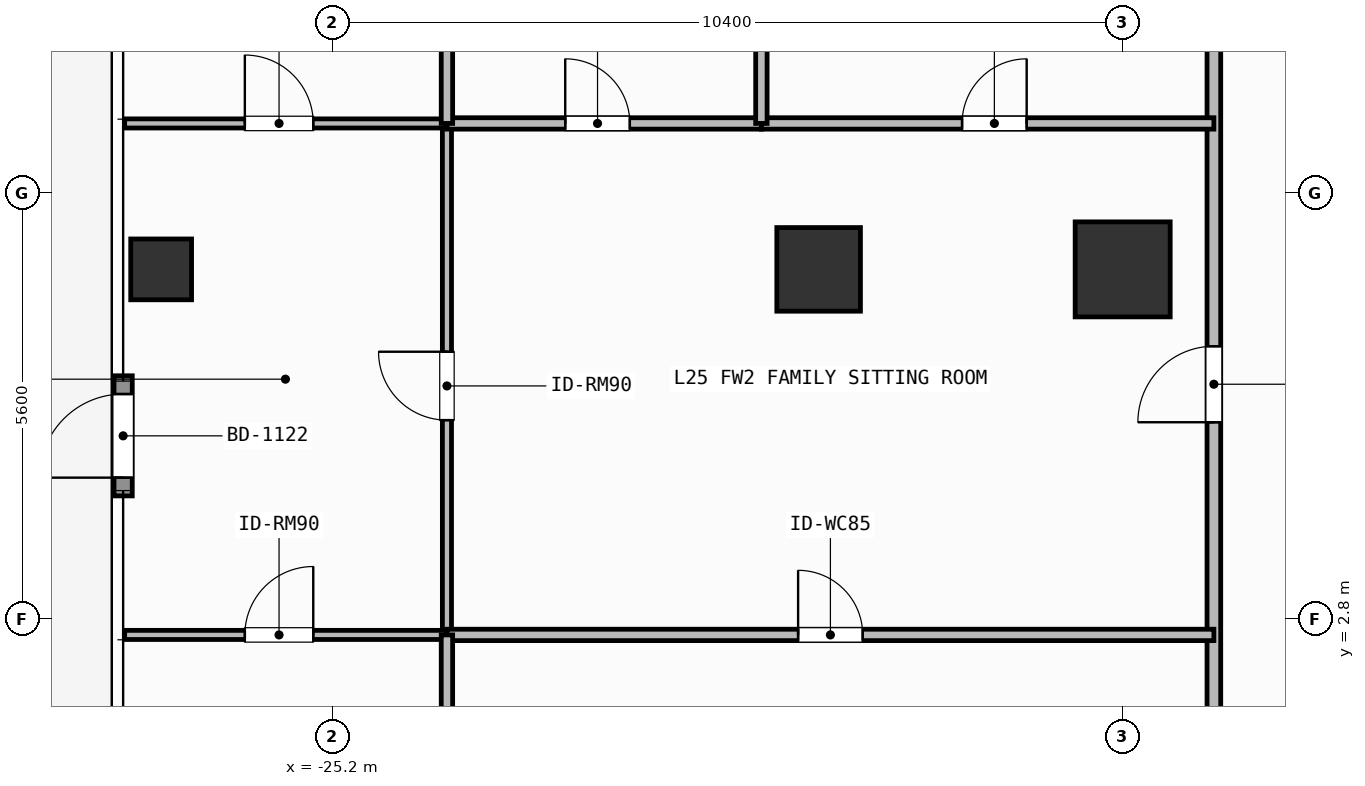
"""IFC4 building model, lengths in metres.
Left out: names, types, materials, properties, quantities, classifications, styles, units other than length and angle.
Written with IfcOpenShell. Run it as: python <this file> out.ifc"""

import sys

from ifc_helpers import new_model, si_unit, direction, frame, frame_2d, origin, origin_2d, place, context, subcontext, project, spatial, rectangle, hollow_rectangle, extrude, element, fill, save


model = new_model("IFC4")
c1 = context("Model", 3, precision=1e-05, world=origin(), true_north=direction((0.0, 1.0)))
c2 = subcontext(c1, "Body", "Model", "MODEL_VIEW")
j1 = project(units=[si_unit("LENGTHUNIT", "METRE"), si_unit("PLANEANGLEUNIT", "RADIAN")], contexts=[c1])
p1 = place(None, origin())
s1 = spatial("IfcSite", under=j1, at=p1, CompositionType="ELEMENT")
p2 = place(p1, origin())
s2 = spatial("IfcBuilding", under=s1, at=p2, CompositionType="ELEMENT")
p3 = place(p2, frame((0.0, 0.0, 100.8)))
s3 = spatial("IfcBuildingStorey", under=s2, at=p3, CompositionType="ELEMENT", Elevation=100.8)
p4 = place(p3, frame((-14.8, 7.4, 0.0), z_axis=(0.0, 0.0, 1.0), x_axis=(1.0, 0.0, 0.0)))
e1 = element("IfcColumn", 1, at=p4, inside=s3, PredefinedType="COLUMN", context=c2, shape_type="SweptSolid", body=[
    extrude(rectangle(XDim=1.25, YDim=1.25, at=origin_2d()), origin(), (0.0, 0.0, 1.0), 3.9),
])
p5 = place(p3, frame((-18.8, 7.4, 0.0), z_axis=(0.0, 0.0, 1.0), x_axis=(1.0, 0.0, 0.0)))
e2 = element("IfcColumn", 2, at=p5, inside=s3, PredefinedType="COLUMN", context=c2, shape_type="SweptSolid", body=[
    extrude(rectangle(XDim=1.1, YDim=1.1, at=origin_2d()), origin(), (0.0, 0.0, 1.0), 3.9),
])
p6 = place(p3, frame((-27.45, 7.4, 0.0), z_axis=(0.0, 0.0, 1.0), x_axis=(1.0, 0.0, 0.0)))
e3 = element("IfcColumn", 3, at=p6, inside=s3, PredefinedType="COLUMN", context=c2, shape_type="SweptSolid", body=[
    extrude(hollow_rectangle(XDim=0.8, YDim=0.8, WallThickness=0.036, at=origin_2d()), origin(), (0.0, 0.0, 1.0), 3.9),
])
p7 = place(p3, frame((-27.95, 4.42, 0.0), z_axis=(0.0, 0.0, 1.0), x_axis=(0.0, 1.0, 0.0)))
e4 = element("IfcWall", 4, at=p7, inside=s3, PredefinedType="SOLIDWALL", context=c2, shape_type="SweptSolid", body=[
    extrude(rectangle(XDim=1.58, YDim=0.24, at=frame_2d((0.79, 0.0))), origin(), (0.0, 0.0, 1.0), 3.68),
])
p8 = place(p7, frame((0.24, 0.0, 0.0)))
e5 = element("IfcOpeningElement", 5, at=p8, cuts=e4, PredefinedType="OPENING", context=c2, shape_type="SweptSolid", body=[
    extrude(rectangle(XDim=1.1, YDim=2.2, at=frame_2d((0.55, 1.1))), frame((0.0, 0.13, 0.0), z_axis=(0.0, -1.0, 0.0), x_axis=(1.0, 0.0, 0.0)), (0.0, 0.0, 1.0), 0.26),
])
p9 = place(p3, frame((-13.6, -1.6, 0.0), z_axis=(0.0, 0.0, 1.0), x_axis=(0.0, 1.0, 0.0)))
e6 = element("IfcWall", 6, at=p9, inside=s3, PredefinedType="PARTITIONING", context=c2, shape_type="SweptSolid", body=[
    extrude(rectangle(XDim=13.72, YDim=0.18, at=frame_2d((6.86, 0.0))), origin(), (0.0, 0.0, 1.0), 3.68),
])
p10 = place(p9, frame((6.989, 0.0, 0.0)))
e7 = element("IfcOpeningElement", 7, at=p10, cuts=e6, PredefinedType="OPENING", context=c2, shape_type="SweptSolid", body=[
    extrude(rectangle(XDim=1.0, YDim=2.2, at=frame_2d((0.5, 1.1))), frame((0.0, 0.1, 0.0), z_axis=(0.0, -1.0, 0.0), x_axis=(1.0, 0.0, 0.0)), (0.0, 0.0, 1.0), 0.2),
])
p11 = place(p3, frame((-23.69, 2.591, 0.0), z_axis=(0.0, 0.0, 1.0), x_axis=(0.0, 1.0, 0.0)))
e8 = element("IfcWall", 8, at=p11, inside=s3, PredefinedType="PARTITIONING", context=c2, shape_type="SweptSolid", body=[
    extrude(rectangle(XDim=6.729, YDim=0.12, at=frame_2d((3.365, 0.0))), origin(), (0.0, 0.0, 1.0), 3.68),
])
p12 = place(p11, frame((2.826, 0.0, 0.0)))
e9 = element("IfcOpeningElement", 9, at=p12, cuts=e8, PredefinedType="OPENING", context=c2, shape_type="SweptSolid", body=[
    extrude(rectangle(XDim=0.9, YDim=2.1, at=frame_2d((0.45, 1.05))), frame((0.0, 0.07, 0.0), z_axis=(0.0, -1.0, 0.0), x_axis=(1.0, 0.0, 0.0)), (0.0, 0.0, 1.0), 0.14),
])
p13 = place(p3, frame((-23.69, 9.32, 0.0), z_axis=(0.0, 0.0, 1.0), x_axis=(1.0, 0.0, 0.0)))
e10 = element("IfcWall", 10, at=p13, inside=s3, PredefinedType="PARTITIONING", context=c2, shape_type="SweptSolid", body=[
    extrude(rectangle(XDim=4.137, YDim=0.15, at=frame_2d((2.068, 0.0))), origin(), (0.0, 0.0, 1.0), 3.68),
])
p14 = place(p13, frame((1.556, 0.0, 0.0)))
e11 = element("IfcOpeningElement", 11, at=p14, cuts=e10, PredefinedType="OPENING", context=c2, shape_type="SweptSolid", body=[
    extrude(rectangle(XDim=0.85, YDim=2.1, at=frame_2d((0.425, 1.05))), frame((0.0, 0.085, 0.0), z_axis=(0.0, -1.0, 0.0), x_axis=(1.0, 0.0, 0.0)), (0.0, 0.0, 1.0), 0.17),
])
p15 = place(p3, frame((-19.553, 9.32, 0.0), z_axis=(0.0, 0.0, 1.0), x_axis=(1.0, 0.0, 0.0)))
e12 = element("IfcWall", 12, at=p15, inside=s3, PredefinedType="PARTITIONING", context=c2, shape_type="SweptSolid", body=[
    extrude(rectangle(XDim=5.953, YDim=0.15, at=frame_2d((2.977, 0.0))), origin(), (0.0, 0.0, 1.0), 3.68),
])
p16 = place(p15, frame((2.64, 0.0, 0.0)))
e13 = element("IfcOpeningElement", 13, at=p16, cuts=e12, PredefinedType="OPENING", context=c2, shape_type="SweptSolid", body=[
    extrude(rectangle(XDim=0.85, YDim=2.1, at=frame_2d((0.425, 1.05))), frame((0.0, 0.085, 0.0), z_axis=(0.0, -1.0, 0.0), x_axis=(1.0, 0.0, 0.0)), (0.0, 0.0, 1.0), 0.17),
])
p17 = place(p3, frame((-23.69, 2.591, 0.0), z_axis=(0.0, 0.0, 1.0), x_axis=(1.0, 0.0, 0.0)))
e14 = element("IfcWall", 14, at=p17, inside=s3, PredefinedType="PARTITIONING", context=c2, shape_type="SweptSolid", body=[
    extrude(rectangle(XDim=10.09, YDim=0.15, at=frame_2d((5.045, 0.0))), origin(), (0.0, 0.0, 1.0), 3.68),
])
p18 = place(p17, frame((4.62, 0.0, 0.0)))
e15 = element("IfcOpeningElement", 15, at=p18, cuts=e14, PredefinedType="OPENING", context=c2, shape_type="SweptSolid", body=[
    extrude(rectangle(XDim=0.85, YDim=2.1, at=frame_2d((0.425, 1.05))), frame((0.0, 0.085, 0.0), z_axis=(0.0, -1.0, 0.0), x_axis=(1.0, 0.0, 0.0)), (0.0, 0.0, 1.0), 0.17),
])
p19 = place(p3, frame((-27.93, 2.591, 0.0), z_axis=(0.0, 0.0, 1.0), x_axis=(1.0, 0.0, 0.0)))
e16 = element("IfcWall", 16, at=p19, inside=s3, PredefinedType="PARTITIONING", context=c2, shape_type="SweptSolid", body=[
    extrude(rectangle(XDim=4.24, YDim=0.12, at=frame_2d((2.12, 0.0))), origin(), (0.0, 0.0, 1.0), 3.68),
])
p20 = place(p19, frame((1.581, 0.0, 0.0)))
e17 = element("IfcOpeningElement", 17, at=p20, cuts=e16, PredefinedType="OPENING", context=c2, shape_type="SweptSolid", body=[
    extrude(rectangle(XDim=0.9, YDim=2.1, at=frame_2d((0.45, 1.05))), frame((0.0, 0.07, 0.0), z_axis=(0.0, -1.0, 0.0), x_axis=(1.0, 0.0, 0.0)), (0.0, 0.0, 1.0), 0.14),
])
p21 = place(p3, frame((-27.93, 9.32, 0.0), z_axis=(0.0, 0.0, 1.0), x_axis=(1.0, 0.0, 0.0)))
e18 = element("IfcWall", 18, at=p21, inside=s3, PredefinedType="PARTITIONING", context=c2, shape_type="SweptSolid", body=[
    extrude(rectangle(XDim=4.24, YDim=0.12, at=frame_2d((2.12, 0.0))), origin(), (0.0, 0.0, 1.0), 3.68),
])
p22 = place(p21, frame((1.581, 0.0, 0.0)))
e19 = element("IfcOpeningElement", 19, at=p22, cuts=e18, PredefinedType="OPENING", context=c2, shape_type="SweptSolid", body=[
    extrude(rectangle(XDim=0.9, YDim=2.1, at=frame_2d((0.45, 1.05))), frame((0.0, 0.07, 0.0), z_axis=(0.0, -1.0, 0.0), x_axis=(1.0, 0.0, 0.0)), (0.0, 0.0, 1.0), 0.14),
])
p23 = place(p3, frame((-19.553, 9.32, 0.0), z_axis=(0.0, 0.0, 1.0), x_axis=(0.0, 1.0, 0.0)))
e20 = element("IfcWall", 20, at=p23, inside=s3, PredefinedType="PARTITIONING", context=c2, shape_type="SweptSolid", body=[
    extrude(rectangle(XDim=2.8, YDim=0.15, at=frame_2d((1.4, 0.0))), origin(), (0.0, 0.0, 1.0), 3.68),
])
p24 = place(p3, frame((-23.69, -1.6, 0.0), z_axis=(0.0, 0.0, 1.0), x_axis=(0.0, 1.0, 0.0)))
e21 = element("IfcWall", 21, at=p24, inside=s3, PredefinedType="PARTITIONING", context=c2, shape_type="SweptSolid", body=[
    extrude(rectangle(XDim=4.191, YDim=0.15, at=frame_2d((2.096, 0.0))), origin(), (0.0, 0.0, 1.0), 3.68),
])
p25 = place(p3, frame((-23.69, 9.32, 0.0), z_axis=(0.0, 0.0, 1.0), x_axis=(0.0, 1.0, 0.0)))
e22 = element("IfcWall", 22, at=p25, inside=s3, PredefinedType="PARTITIONING", context=c2, shape_type="SweptSolid", body=[
    extrude(rectangle(XDim=2.8, YDim=0.15, at=frame_2d((1.4, 0.0))), origin(), (0.0, 0.0, 1.0), 3.68),
])
p26 = place(p8, origin())
e23 = element("IfcDoor", 23, at=p26, inside=s3, OperationType="SINGLE_SWING_LEFT", PredefinedType="DOOR", context=c2, shape_type="SweptSolid", body=[
    extrude(rectangle(XDim=1.1, YDim=2.2, at=frame_2d((0.55, 1.1))), frame((0.0, 0.025, 0.0), z_axis=(0.0, -1.0, 0.0), x_axis=(1.0, 0.0, 0.0)), (0.0, 0.0, 1.0), 0.05),
])
fill(e5, e23)
p27 = place(p10, origin())
e24 = element("IfcDoor", 24, at=p27, inside=s3, OperationType="SINGLE_SWING_LEFT", PredefinedType="DOOR", context=c2, shape_type="SweptSolid", body=[
    extrude(rectangle(XDim=1.0, YDim=2.2, at=frame_2d((0.5, 1.1))), frame((0.0, 0.025, 0.0), z_axis=(0.0, -1.0, 0.0), x_axis=(1.0, 0.0, 0.0)), (0.0, 0.0, 1.0), 0.05),
])
fill(e7, e24)
p28 = place(p12, origin())
e25 = element("IfcDoor", 25, at=p28, inside=s3, OperationType="SINGLE_SWING_RIGHT", PredefinedType="DOOR", context=c2, shape_type="SweptSolid", body=[
    extrude(rectangle(XDim=0.9, YDim=2.1, at=frame_2d((0.45, 1.05))), frame((0.0, 0.025, 0.0), z_axis=(0.0, -1.0, 0.0), x_axis=(1.0, 0.0, 0.0)), (0.0, 0.0, 1.0), 0.05),
])
fill(e9, e25)
p29 = place(p14, origin())
e26 = element("IfcDoor", 26, at=p29, inside=s3, OperationType="SINGLE_SWING_LEFT", PredefinedType="DOOR", context=c2, shape_type="SweptSolid", body=[
    extrude(rectangle(XDim=0.85, YDim=2.1, at=frame_2d((0.425, 1.05))), frame((0.0, 0.025, 0.0), z_axis=(0.0, -1.0, 0.0), x_axis=(1.0, 0.0, 0.0)), (0.0, 0.0, 1.0), 0.05),
])
fill(e11, e26)
p30 = place(p16, origin())
e27 = element("IfcDoor", 27, at=p30, inside=s3, OperationType="SINGLE_SWING_RIGHT", PredefinedType="DOOR", context=c2, shape_type="SweptSolid", body=[
    extrude(rectangle(XDim=0.85, YDim=2.1, at=frame_2d((0.425, 1.05))), frame((0.0, 0.025, 0.0), z_axis=(0.0, -1.0, 0.0), x_axis=(1.0, 0.0, 0.0)), (0.0, 0.0, 1.0), 0.05),
])
fill(e13, e27)
p31 = place(p18, origin())
e28 = element("IfcDoor", 28, at=p31, inside=s3, OperationType="SINGLE_SWING_LEFT", PredefinedType="DOOR", context=c2, shape_type="SweptSolid", body=[
    extrude(rectangle(XDim=0.85, YDim=2.1, at=frame_2d((0.425, 1.05))), frame((0.0, 0.025, 0.0), z_axis=(0.0, -1.0, 0.0), x_axis=(1.0, 0.0, 0.0)), (0.0, 0.0, 1.0), 0.05),
])
fill(e15, e28)
p32 = place(p20, origin())
e29 = element("IfcDoor", 29, at=p32, inside=s3, OperationType="SINGLE_SWING_RIGHT", PredefinedType="DOOR", context=c2, shape_type="SweptSolid", body=[
    extrude(rectangle(XDim=0.9, YDim=2.1, at=frame_2d((0.45, 1.05))), frame((0.0, 0.025, 0.0), z_axis=(0.0, -1.0, 0.0), x_axis=(1.0, 0.0, 0.0)), (0.0, 0.0, 1.0), 0.05),
])
fill(e17, e29)
p33 = place(p22, origin())
e30 = element("IfcDoor", 30, at=p33, inside=s3, OperationType="SINGLE_SWING_LEFT", PredefinedType="DOOR", context=c2, shape_type="SweptSolid", body=[
    extrude(rectangle(XDim=0.9, YDim=2.1, at=frame_2d((0.45, 1.05))), frame((0.0, 0.025, 0.0), z_axis=(0.0, -1.0, 0.0), x_axis=(1.0, 0.0, 0.0)), (0.0, 0.0, 1.0), 0.05),
])
fill(e19, e30)
save(model, sys.argv[1])
